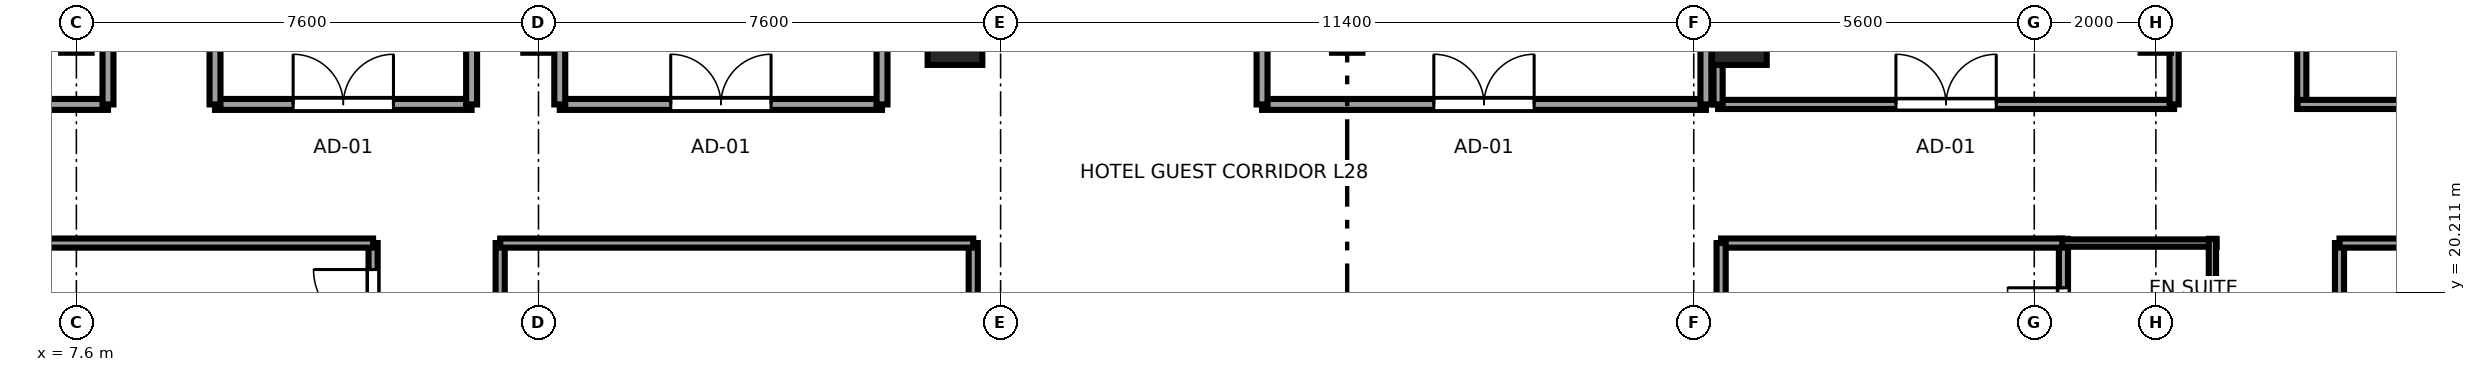
"""IFC4 building model, lengths in metres.
Left out: names, types, materials, properties, quantities, classifications, styles, units other than length and angle.
Written with IfcOpenShell. Run it as: python <this file> out.ifc"""

import sys

from ifc_helpers import new_model, si_unit, direction, frame, frame_2d, origin, origin_2d, place, context, subcontext, project, spatial, rectangle, extrude, source, transform, mapped, element, fill, save


model = new_model("IFC4")
c1 = context("Model", 3, precision=1e-05, world=origin(), true_north=direction((0.0, 1.0)))
c2 = subcontext(c1, "Body", "Model", "MODEL_VIEW")
j1 = project(units=[si_unit("LENGTHUNIT", "METRE"), si_unit("PLANEANGLEUNIT", "RADIAN")], contexts=[c1])
p1 = place(None, origin())
s1 = spatial("IfcSite", under=j1, at=p1, CompositionType="ELEMENT")
p2 = place(p1, origin())
s2 = spatial("IfcBuilding", under=s1, at=p2, CompositionType="ELEMENT")
p3 = place(p2, frame((0.0, 0.0, 111.55)))
s3 = spatial("IfcBuildingStorey", under=s2, at=p3, CompositionType="ELEMENT", Elevation=111.55)
m1 = source(origin(), c2, "Body", "SweptSolid", [
    extrude(rectangle(XDim=0.9, YDim=0.9, at=origin_2d()), origin(), (0.0, 0.0, 1.0), 3.55),
])
for number, where, z_axis, x_axis in (
    (1, (22.05, 24.4, 0.0), (0.0, 0.0, 1.0), (1.0, 0.0, 0.0)),
    (2, (34.95, 24.4, 0.0), (0.0, 0.0, 1.0), (1.0, 0.0, 0.0)),
):
    element("IfcColumn", number, at=place(p3, frame(where, z_axis=z_axis, x_axis=x_axis)), inside=s3, PredefinedType="COLUMN", context=c2, shape_type="MappedRepresentation", body=[
        mapped(m1, transform((0.0, 0.0, 0.0), x_axis=(1.0, 0.0, 0.0), y_axis=(0.0, 1.0, 0.0), z_axis=(0.0, 0.0, 1.0), scale=1.0)),
    ])
p4 = place(p3, frame((40.28, 18.7, 0.0), z_axis=(0.0, 0.0, 1.0), x_axis=(0.0, 1.0, 0.0)))
e3 = element("IfcWall", 3, at=p4, inside=s3, PredefinedType="PARTITIONING", context=c2, shape_type="SweptSolid", body=[
    extrude(rectangle(XDim=2.39, YDim=0.15, at=frame_2d((1.195, 0.0))), origin(), (0.0, 0.0, 1.0), 3.37),
])
p5 = place(p4, frame((0.665, 0.0, 0.0)))
e4 = element("IfcOpeningElement", 4, at=p5, cuts=e3, PredefinedType="OPENING", context=c2, shape_type="SweptSolid", body=[
    extrude(rectangle(XDim=0.92, YDim=2.01, at=frame_2d((0.46, 1.005))), frame((0.0, 0.085, 0.0), z_axis=(0.0, -1.0, 0.0), x_axis=(1.0, 0.0, 0.0)), (0.0, 0.0, 1.0), 0.17),
])
p6 = place(p3, frame((40.21, 21.02, 0.0), z_axis=(0.0, 0.0, 1.0), x_axis=(1.0, 0.0, 0.0)))
e5 = element("IfcWall", 5, at=p6, inside=s3, PredefinedType="PLUMBINGWALL", context=c2, shape_type="SweptSolid", body=[
    extrude(rectangle(XDim=2.59, YDim=0.12, at=frame_2d((1.295, 0.0))), origin(), (0.0, 0.0, 1.0), 3.37),
])
p7 = place(p3, frame((42.73, 18.7, 0.0), z_axis=(0.0, 0.0, 1.0), x_axis=(0.0, 1.0, 0.0)))
e6 = element("IfcWall", 6, at=p7, inside=s3, PredefinedType="PLUMBINGWALL", context=c2, shape_type="SweptSolid", body=[
    extrude(rectangle(XDim=2.39, YDim=0.12, at=frame_2d((1.195, 0.0))), origin(), (0.0, 0.0, 1.0), 3.37),
])
p8 = place(p3, frame((12.48, 19.21, 0.0), z_axis=(0.0, 0.0, 1.0), x_axis=(0.0, 1.0, 0.0)))
e7 = element("IfcWall", 7, at=p8, inside=s3, PredefinedType="PARTITIONING", context=c2, shape_type="SweptSolid", body=[
    extrude(rectangle(XDim=1.81, YDim=0.15, at=frame_2d((0.905, 0.0))), origin(), (0.0, 0.0, 1.0), 3.37),
])
p9 = place(p8, frame((0.395, 0.0, 0.0)))
e8 = element("IfcOpeningElement", 8, at=p9, cuts=e7, PredefinedType="OPENING", context=c2, shape_type="SweptSolid", body=[
    extrude(rectangle(XDim=0.98, YDim=2.12, at=frame_2d((0.49, 1.06))), frame((0.0, 0.085, 0.0), z_axis=(0.0, -1.0, 0.0), x_axis=(1.0, 0.0, 0.0)), (0.0, 0.0, 1.0), 0.17),
])
p10 = place(p3, frame((0.405, 21.02, 0.0), z_axis=(0.0, 0.0, 1.0), x_axis=(1.0, 0.0, 0.0)))
e9 = element("IfcWall", 9, at=p10, inside=s3, PredefinedType="PARTITIONING", context=c2, shape_type="SweptSolid", body=[
    extrude(rectangle(XDim=12.075, YDim=0.15, at=frame_2d((6.038, 0.0))), origin(), (0.0, 0.0, 1.0), 3.37),
])
p11 = place(p3, frame((14.57, 13.01, 0.0), z_axis=(0.0, 0.0, 1.0), x_axis=(0.0, 1.0, 0.0)))
e10 = element("IfcWall", 10, at=p11, inside=s3, PredefinedType="PARTITIONING", context=c2, shape_type="SweptSolid", body=[
    extrude(rectangle(XDim=8.01, YDim=0.15, at=frame_2d((4.005, 0.0))), origin(), (0.0, 0.0, 1.0), 3.37),
])
p12 = place(p11, frame((4.445, 0.0, 0.0)))
e11 = element("IfcOpeningElement", 11, at=p12, cuts=e10, PredefinedType="OPENING", context=c2, shape_type="SweptSolid", body=[
    extrude(rectangle(XDim=0.98, YDim=2.12, at=frame_2d((0.49, 1.06))), frame((0.0, 0.085, 0.0), z_axis=(0.0, -1.0, 0.0), x_axis=(1.0, 0.0, 0.0)), (0.0, 0.0, 1.0), 0.17),
])
p13 = place(p3, frame((22.35, 10.68, 0.0), z_axis=(0.0, 0.0, 1.0), x_axis=(0.0, 1.0, 0.0)))
e12 = element("IfcWall", 12, at=p13, inside=s3, PredefinedType="PARTITIONING", context=c2, shape_type="SweptSolid", body=[
    extrude(rectangle(XDim=10.34, YDim=0.15, at=frame_2d((5.17, 0.0))), origin(), (0.0, 0.0, 1.0), 3.37),
])
p14 = place(p3, frame((14.57, 21.02, 0.0), z_axis=(0.0, 0.0, 1.0), x_axis=(1.0, 0.0, 0.0)))
e13 = element("IfcWall", 13, at=p14, inside=s3, PredefinedType="PARTITIONING", context=c2, shape_type="SweptSolid", body=[
    extrude(rectangle(XDim=7.78, YDim=0.15, at=frame_2d((3.89, 0.0))), origin(), (0.0, 0.0, 1.0), 3.37),
])
p15 = place(p3, frame((34.65, 21.02, 0.0), z_axis=(0.0, 0.0, 1.0), x_axis=(1.0, 0.0, 0.0)))
e14 = element("IfcWall", 14, at=p15, inside=s3, PredefinedType="PARTITIONING", context=c2, shape_type="SweptSolid", body=[
    extrude(rectangle(XDim=5.61, YDim=0.15, at=frame_2d((2.805, 0.0))), origin(), (0.0, 0.0, 1.0), 3.37),
])
p16 = place(p3, frame((34.65, 14.08, 0.0), z_axis=(0.0, 0.0, 1.0), x_axis=(0.0, 1.0, 0.0)))
e15 = element("IfcWall", 15, at=p16, inside=s3, PredefinedType="PARTITIONING", context=c2, shape_type="SweptSolid", body=[
    extrude(rectangle(XDim=6.94, YDim=0.15, at=frame_2d((3.47, 0.0))), origin(), (0.0, 0.0, 1.0), 3.37),
])
p17 = place(p3, frame((44.82, 17.913, 0.0), z_axis=(0.0, 0.0, 1.0), x_axis=(0.0, 1.0, 0.0)))
e16 = element("IfcWall", 16, at=p17, inside=s3, PredefinedType="PARTITIONING", context=c2, shape_type="SweptSolid", body=[
    extrude(rectangle(XDim=3.107, YDim=0.15, at=frame_2d((1.553, 0.0))), origin(), (0.0, 0.0, 1.0), 3.37),
])
p18 = place(p17, frame((1.043, 0.0, 0.0)))
e17 = element("IfcOpeningElement", 17, at=p18, cuts=e16, PredefinedType="OPENING", context=c2, shape_type="SweptSolid", body=[
    extrude(rectangle(XDim=0.98, YDim=2.12, at=frame_2d((0.49, 1.06))), frame((0.0, 0.085, 0.0), z_axis=(0.0, -1.0, 0.0), x_axis=(1.0, 0.0, 0.0)), (0.0, 0.0, 1.0), 0.17),
])
p19 = place(p3, frame((44.82, 21.02, 0.0), z_axis=(0.0, 0.0, 1.0), x_axis=(1.0, 0.0, 0.0)))
e18 = element("IfcWall", 18, at=p19, inside=s3, PredefinedType="PARTITIONING", context=c2, shape_type="SweptSolid", body=[
    extrude(rectangle(XDim=11.775, YDim=0.15, at=frame_2d((5.887, 0.0))), origin(), (0.0, 0.0, 1.0), 3.37),
])
p20 = place(p3, frame((0.405, 23.3, 0.0), z_axis=(0.0, 0.0, 1.0), x_axis=(1.0, 0.0, 0.0)))
e19 = element("IfcWall", 19, at=p20, inside=s3, PredefinedType="PARTITIONING", context=c2, shape_type="SweptSolid", body=[
    extrude(rectangle(XDim=7.715, YDim=0.18, at=frame_2d((3.857, 0.0))), origin(), (0.0, 0.0, 1.0), 3.37),
])
p21 = place(p3, frame((8.12, 23.3, 0.0), z_axis=(0.0, 0.0, 1.0), x_axis=(0.0, 1.0, 0.0)))
e20 = element("IfcWall", 20, at=p21, inside=s3, PredefinedType="PARTITIONING", context=c2, shape_type="SweptSolid", body=[
    extrude(rectangle(XDim=7.9, YDim=0.18, at=frame_2d((3.95, 0.0))), origin(), (0.0, 0.0, 1.0), 3.37),
])
p22 = place(p21, frame((3.125, 0.0, 0.0)))
e21 = element("IfcOpeningElement", 21, at=p22, cuts=e20, PredefinedType="OPENING", context=c2, shape_type="SweptSolid", body=[
    extrude(rectangle(XDim=1.65, YDim=2.15, at=frame_2d((0.825, 1.075))), frame((0.0, 0.1, 0.0), z_axis=(0.0, -1.0, 0.0), x_axis=(1.0, 0.0, 0.0)), (0.0, 0.0, 1.0), 0.2),
])
p23 = place(p3, frame((44.2, 23.23, 0.0), z_axis=(0.0, 0.0, 1.0), x_axis=(0.0, 1.0, 0.0)))
e22 = element("IfcWall", 22, at=p23, inside=s3, PredefinedType="PARTITIONING", context=c2, shape_type="SweptSolid", body=[
    extrude(rectangle(XDim=3.94, YDim=0.15, at=frame_2d((1.97, 0.0))), origin(), (0.0, 0.0, 1.0), 3.37),
])
p24 = place(p23, frame((1.34, 0.0, 0.0)))
e23 = element("IfcOpeningElement", 23, at=p24, cuts=e22, PredefinedType="OPENING", context=c2, shape_type="SweptSolid", body=[
    extrude(rectangle(XDim=0.92, YDim=2.01, at=frame_2d((0.46, 1.005))), frame((0.0, 0.085, 0.0), z_axis=(0.0, -1.0, 0.0), x_axis=(1.0, 0.0, 0.0)), (0.0, 0.0, 1.0), 0.17),
])
p25 = place(p3, frame((44.13, 23.3, 0.0), z_axis=(0.0, 0.0, 1.0), x_axis=(1.0, 0.0, 0.0)))
e24 = element("IfcWall", 24, at=p25, inside=s3, PredefinedType="PARTITIONING", context=c2, shape_type="SweptSolid", body=[
    extrude(rectangle(XDim=4.54, YDim=0.15, at=frame_2d((2.27, 0.0))), origin(), (0.0, 0.0, 1.0), 3.37),
])
p26 = place(p3, frame((9.88, 23.3, 0.0), z_axis=(0.0, 0.0, 1.0), x_axis=(1.0, 0.0, 0.0)))
e25 = element("IfcWall", 25, at=p26, inside=s3, PredefinedType="PARTITIONING", context=c2, shape_type="SweptSolid", body=[
    extrude(rectangle(XDim=4.22, YDim=0.18, at=frame_2d((2.11, 0.0))), origin(), (0.0, 0.0, 1.0), 3.37),
])
p27 = place(p26, frame((1.285, 0.0, 0.0)))
e26 = element("IfcOpeningElement", 26, at=p27, cuts=e25, PredefinedType="OPENING", context=c2, shape_type="SweptSolid", body=[
    extrude(rectangle(XDim=1.65, YDim=2.15, at=frame_2d((0.825, 1.075))), frame((0.0, 0.1, 0.0), z_axis=(0.0, -1.0, 0.0), x_axis=(1.0, 0.0, 0.0)), (0.0, 0.0, 1.0), 0.2),
])
for number, where, z_axis, x_axis in (
    (27, (9.88, 23.3, 0.0), (0.0, 0.0, 1.0), (0.0, 1.0, 0.0)),
    (28, (14.1, 23.3, 0.0), (0.0, 0.0, 1.0), (0.0, 1.0, 0.0)),
):
    element("IfcWall", number, at=place(p3, frame(where, z_axis=z_axis, x_axis=x_axis)), inside=s3, PredefinedType="PARTITIONING", context=c2, shape_type="SweptSolid", body=[
        extrude(rectangle(XDim=6.45, YDim=0.18, at=frame_2d((3.225, 0.0))), origin(), (0.0, 0.0, 1.0), 3.37),
    ])
p28 = place(p3, frame((27.1, 23.3, 0.0), z_axis=(0.0, 0.0, 1.0), x_axis=(1.0, 0.0, 0.0)))
e29 = element("IfcWall", 29, at=p28, inside=s3, PredefinedType="PARTITIONING", context=c2, shape_type="SweptSolid", body=[
    extrude(rectangle(XDim=7.3, YDim=0.18, at=frame_2d((3.65, 0.0))), origin(), (0.0, 0.0, 1.0), 3.37),
])
p29 = place(p28, frame((2.825, 0.0, 0.0)))
e30 = element("IfcOpeningElement", 30, at=p29, cuts=e29, PredefinedType="OPENING", context=c2, shape_type="SweptSolid", body=[
    extrude(rectangle(XDim=1.65, YDim=2.15, at=frame_2d((0.825, 1.075))), frame((0.0, 0.1, 0.0), z_axis=(0.0, -1.0, 0.0), x_axis=(1.0, 0.0, 0.0)), (0.0, 0.0, 1.0), 0.2),
])
for number, where, z_axis, x_axis in (
    (31, (27.1, 23.3, 0.0), (0.0, 0.0, 1.0), (0.0, 1.0, 0.0)),
    (32, (34.4, 23.3, 0.0), (0.0, 0.0, 1.0), (0.0, 1.0, 0.0)),
):
    element("IfcWall", number, at=place(p3, frame(where, z_axis=z_axis, x_axis=x_axis)), inside=s3, PredefinedType="PARTITIONING", context=c2, shape_type="SweptSolid", body=[
        extrude(rectangle(XDim=6.5, YDim=0.18, at=frame_2d((3.25, 0.0))), origin(), (0.0, 0.0, 1.0), 3.37),
    ])
p30 = place(p3, frame((15.55, 23.3, 0.0), z_axis=(0.0, 0.0, 1.0), x_axis=(1.0, 0.0, 0.0)))
e33 = element("IfcWall", 33, at=p30, inside=s3, PredefinedType="PARTITIONING", context=c2, shape_type="SweptSolid", body=[
    extrude(rectangle(XDim=5.3, YDim=0.18, at=frame_2d((2.65, 0.0))), origin(), (0.0, 0.0, 1.0), 3.37),
])
p31 = place(p30, frame((1.825, 0.0, 0.0)))
e34 = element("IfcOpeningElement", 34, at=p31, cuts=e33, PredefinedType="OPENING", context=c2, shape_type="SweptSolid", body=[
    extrude(rectangle(XDim=1.65, YDim=2.15, at=frame_2d((0.825, 1.075))), frame((0.0, 0.1, 0.0), z_axis=(0.0, -1.0, 0.0), x_axis=(1.0, 0.0, 0.0)), (0.0, 0.0, 1.0), 0.2),
])
for number, where, z_axis, x_axis in (
    (35, (15.55, 23.3, 0.0), (0.0, 0.0, 1.0), (0.0, 1.0, 0.0)),
    (36, (20.85, 23.3, 0.0), (0.0, 0.0, 1.0), (0.0, 1.0, 0.0)),
):
    element("IfcWall", number, at=place(p3, frame(where, z_axis=z_axis, x_axis=x_axis)), inside=s3, PredefinedType="PARTITIONING", context=c2, shape_type="SweptSolid", body=[
        extrude(rectangle(XDim=6.5, YDim=0.18, at=frame_2d((3.25, 0.0))), origin(), (0.0, 0.0, 1.0), 3.37),
    ])
p32 = place(p3, frame((34.6, 23.3, 0.0), z_axis=(0.0, 0.0, 1.0), x_axis=(1.0, 0.0, 0.0)))
e37 = element("IfcWall", 37, at=p32, inside=s3, PredefinedType="PARTITIONING", context=c2, shape_type="SweptSolid", body=[
    extrude(rectangle(XDim=7.5, YDim=0.15, at=frame_2d((3.75, 0.0))), origin(), (0.0, 0.0, 1.0), 3.37),
])
p33 = place(p32, frame((2.925, 0.0, 0.0)))
e38 = element("IfcOpeningElement", 38, at=p33, cuts=e37, PredefinedType="OPENING", context=c2, shape_type="SweptSolid", body=[
    extrude(rectangle(XDim=1.65, YDim=2.15, at=frame_2d((0.825, 1.075))), frame((0.0, 0.085, 0.0), z_axis=(0.0, -1.0, 0.0), x_axis=(1.0, 0.0, 0.0)), (0.0, 0.0, 1.0), 0.17),
])
p34 = place(p3, frame((34.6, 23.3, 0.0), z_axis=(0.0, 0.0, 1.0), x_axis=(0.0, 1.0, 0.0)))
e39 = element("IfcWall", 39, at=p34, inside=s3, PredefinedType="PARTITIONING", context=c2, shape_type="SweptSolid", body=[
    extrude(rectangle(XDim=6.1, YDim=0.15, at=frame_2d((3.05, 0.0))), origin(), (0.0, 0.0, 1.0), 3.37),
])
p35 = place(p3, frame((42.1, 23.3, 0.0), z_axis=(0.0, 0.0, 1.0), x_axis=(0.0, 1.0, 0.0)))
e40 = element("IfcWall", 40, at=p35, inside=s3, PredefinedType="PARTITIONING", context=c2, shape_type="SweptSolid", body=[
    extrude(rectangle(XDim=6.1, YDim=0.15, at=frame_2d((3.05, 0.0))), origin(), (0.0, 0.0, 1.0), 2.16),
])
m2 = source(origin(), c2, "Body", "SweptSolid", [
    extrude(rectangle(XDim=0.92, YDim=2.01, at=frame_2d((0.46, 1.005))), frame((0.0, 0.025, 0.0), z_axis=(0.0, -1.0, 0.0), x_axis=(1.0, 0.0, 0.0)), (0.0, 0.0, 1.0), 0.05),
])
p36 = place(p5, origin())
e41 = element("IfcDoor", 41, at=p36, inside=s3, OperationType="SINGLE_SWING_RIGHT", PredefinedType="DOOR", context=c2, shape_type="MappedRepresentation", body=[
    mapped(m2, transform((0.0, 0.0, 0.0), x_axis=(1.0, 0.0, 0.0), y_axis=(0.0, 1.0, 0.0), z_axis=(0.0, 0.0, 1.0), scale=1.0)),
])
fill(e4, e41)
m3 = source(origin(), c2, "Body", "SweptSolid", [
    extrude(rectangle(XDim=0.98, YDim=2.12, at=frame_2d((0.49, 1.06))), frame((0.0, 0.025, 0.0), z_axis=(0.0, -1.0, 0.0), x_axis=(1.0, 0.0, 0.0)), (0.0, 0.0, 1.0), 0.05),
])
p37 = place(p9, origin())
e42 = element("IfcDoor", 42, at=p37, inside=s3, OperationType="SINGLE_SWING_RIGHT", PredefinedType="DOOR", context=c2, shape_type="MappedRepresentation", body=[
    mapped(m3, transform((0.0, 0.0, 0.0), x_axis=(1.0, 0.0, 0.0), y_axis=(0.0, 1.0, 0.0), z_axis=(0.0, 0.0, 1.0), scale=1.0)),
])
fill(e8, e42)
m4 = source(origin(), c2, "Body", "SweptSolid", [
    extrude(rectangle(XDim=1.65, YDim=2.15, at=frame_2d((0.825, 1.075))), frame((0.0, 0.025, 0.0), z_axis=(0.0, -1.0, 0.0), x_axis=(1.0, 0.0, 0.0)), (0.0, 0.0, 1.0), 0.05),
])
p38 = place(p27, origin())
e43 = element("IfcDoor", 43, at=p38, inside=s3, OperationType="DOUBLE_DOOR_SINGLE_SWING", PredefinedType="DOOR", context=c2, shape_type="MappedRepresentation", body=[
    mapped(m4, transform((0.0, 0.0, 0.0), x_axis=(1.0, 0.0, 0.0), y_axis=(0.0, 1.0, 0.0), z_axis=(0.0, 0.0, 1.0), scale=1.0)),
])
fill(e26, e43)
p39 = place(p29, origin())
e44 = element("IfcDoor", 44, at=p39, inside=s3, OperationType="DOUBLE_DOOR_SINGLE_SWING", PredefinedType="DOOR", context=c2, shape_type="MappedRepresentation", body=[
    mapped(m4, transform((0.0, 0.0, 0.0), x_axis=(1.0, 0.0, 0.0), y_axis=(0.0, 1.0, 0.0), z_axis=(0.0, 0.0, 1.0), scale=1.0)),
])
fill(e30, e44)
p40 = place(p31, origin())
e45 = element("IfcDoor", 45, at=p40, inside=s3, OperationType="DOUBLE_DOOR_SINGLE_SWING", PredefinedType="DOOR", context=c2, shape_type="MappedRepresentation", body=[
    mapped(m4, transform((0.0, 0.0, 0.0), x_axis=(1.0, 0.0, 0.0), y_axis=(0.0, 1.0, 0.0), z_axis=(0.0, 0.0, 1.0), scale=1.0)),
])
fill(e34, e45)
p41 = place(p33, origin())
e46 = element("IfcDoor", 46, at=p41, inside=s3, OperationType="DOUBLE_DOOR_SINGLE_SWING", PredefinedType="DOOR", context=c2, shape_type="MappedRepresentation", body=[
    mapped(m4, transform((0.0, 0.0, 0.0), x_axis=(1.0, 0.0, 0.0), y_axis=(0.0, 1.0, 0.0), z_axis=(0.0, 0.0, 1.0), scale=1.0)),
])
fill(e38, e46)
save(model, sys.argv[1])
